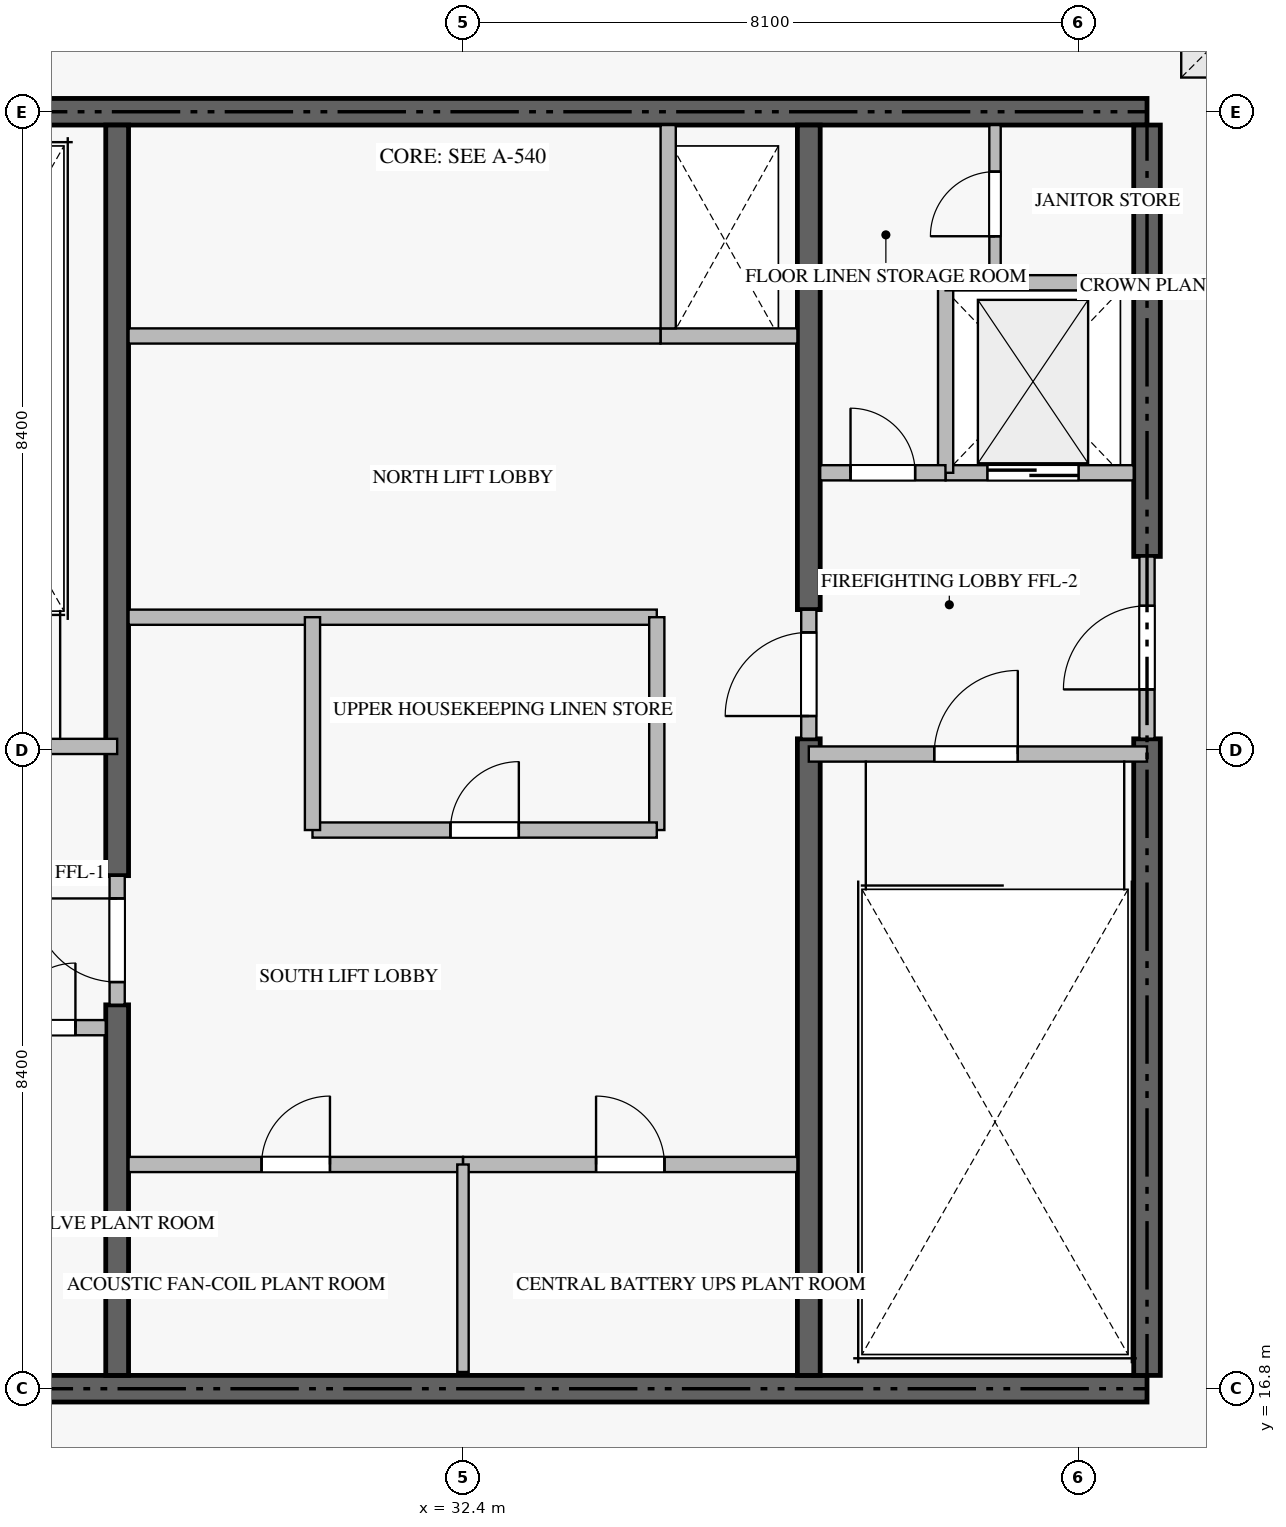
"""IFC4 building model, lengths in metres.
Left out: names, types, materials, properties, quantities, classifications, styles, units other than length and angle.
Written with IfcOpenShell. Run it as: python <this file> out.ifc"""

import sys

from ifc_helpers import new_model, si_unit, direction, frame, frame_2d, origin, origin_2d, place, context, subcontext, project, spatial, rectangle, extrude, source, transform, mapped, element, fill, save


model = new_model("IFC4")
c1 = context("Model", 3, precision=1e-05, world=origin(), true_north=direction((0.0, 1.0)))
c2 = subcontext(c1, "Body", "Model", "MODEL_VIEW")
j1 = project(units=[si_unit("LENGTHUNIT", "METRE"), si_unit("PLANEANGLEUNIT", "RADIAN")], contexts=[c1])
p1 = place(None, origin())
s1 = spatial("IfcSite", under=j1, at=p1, CompositionType="ELEMENT")
p2 = place(p1, origin())
s2 = spatial("IfcBuilding", under=s1, at=p2, CompositionType="ELEMENT")
p3 = place(p2, frame((0.0, 0.0, 365.75)))
s3 = spatial("IfcBuildingStorey", under=s2, at=p3, CompositionType="ELEMENT", Elevation=365.75)
for number, where, z_axis, x_axis in (
    (1, (23.4, 16.8, -0.36), (0.0, 0.0, 1.0), (1.0, 0.0, 0.0)),
    (2, (41.4, 33.6, -0.36), (0.0, 0.0, 1.0), (-1.0, 0.0, 0.0)),
):
    element("IfcWall", number, at=place(p3, frame(where, z_axis=z_axis, x_axis=x_axis)), inside=s3, PredefinedType="SHEAR", context=c2, shape_type="SweptSolid", body=[
        extrude(rectangle(XDim=18.0, YDim=0.35, at=frame_2d((9.0, 0.0))), origin(), (0.0, 0.0, 1.0), 5.258),
    ])
p4 = place(p3, frame((41.4, 16.975, -0.36), z_axis=(0.0, 0.0, 1.0), x_axis=(0.0, 1.0, 0.0)))
e3 = element("IfcWall", 3, at=p4, inside=s3, PredefinedType="SHEAR", context=c2, shape_type="SweptSolid", body=[
    extrude(rectangle(XDim=8.375, YDim=0.35, at=frame_2d((4.188, 0.0))), origin(), (0.0, 0.0, 1.0), 5.258),
])
p5 = place(p3, frame((41.4, 27.75, -0.36), z_axis=(0.0, 0.0, 1.0), x_axis=(0.0, 1.0, 0.0)))
e4 = element("IfcWall", 4, at=p5, inside=s3, PredefinedType="SHEAR", context=c2, shape_type="SweptSolid", body=[
    extrude(rectangle(XDim=5.675, YDim=0.35, at=frame_2d((2.837, 0.0))), origin(), (0.0, 0.0, 1.0), 5.258),
])
p6 = place(p3, frame((27.85, 16.975, -0.36), z_axis=(0.0, 0.0, 1.0), x_axis=(0.0, 1.0, 0.0)))
e5 = element("IfcWall", 5, at=p6, inside=s3, PredefinedType="SHEAR", context=c2, shape_type="SweptSolid", body=[
    extrude(rectangle(XDim=4.875, YDim=0.3, at=frame_2d((2.438, 0.0))), origin(), (0.0, 0.0, 1.0), 5.258),
])
p7 = place(p3, frame((27.85, 23.55, -0.36), z_axis=(0.0, 0.0, 1.0), x_axis=(0.0, 1.0, 0.0)))
e6 = element("IfcWall", 6, at=p7, inside=s3, PredefinedType="SHEAR", context=c2, shape_type="SweptSolid", body=[
    extrude(rectangle(XDim=9.875, YDim=0.3, at=frame_2d((4.938, 0.0))), origin(), (0.0, 0.0, 1.0), 5.258),
])
p8 = place(p3, frame((36.95, 16.975, -0.36), z_axis=(0.0, 0.0, 1.0), x_axis=(0.0, 1.0, 0.0)))
e7 = element("IfcWall", 7, at=p8, inside=s3, PredefinedType="SHEAR", context=c2, shape_type="SweptSolid", body=[
    extrude(rectangle(XDim=8.375, YDim=0.3, at=frame_2d((4.188, 0.0))), origin(), (0.0, 0.0, 1.0), 5.258),
])
p9 = place(p3, frame((36.95, 27.05, -0.36), z_axis=(0.0, 0.0, 1.0), x_axis=(0.0, 1.0, 0.0)))
e8 = element("IfcWall", 8, at=p9, inside=s3, PredefinedType="SHEAR", context=c2, shape_type="SweptSolid", body=[
    extrude(rectangle(XDim=6.375, YDim=0.3, at=frame_2d((3.188, 0.0))), origin(), (0.0, 0.0, 1.0), 5.258),
])
p10 = place(p3, frame((23.4, 25.25, 0.0), z_axis=(0.0, 0.0, 1.0), x_axis=(1.0, 0.0, 0.0)))
e9 = element("IfcWall", 9, at=p10, inside=s3, PredefinedType="STANDARD", context=c2, shape_type="SweptSolid", body=[
    extrude(rectangle(XDim=4.45, YDim=0.2, at=frame_2d((2.225, 0.0))), origin(), (0.0, 0.0, 1.0), 4.9),
])
p11 = place(p10, frame((1.65, 0.0, 0.0)))
e10 = element("IfcOpeningElement", 10, at=p11, cuts=e9, PredefinedType="OPENING", context=c2, shape_type="SweptSolid", body=[
    extrude(rectangle(XDim=1.1, YDim=2.15, at=frame_2d((0.55, 1.075))), frame((0.0, 0.11, 0.0), z_axis=(0.0, -1.0, 0.0), x_axis=(1.0, 0.0, 0.0)), (0.0, 0.0, 1.0), 0.22),
])
p12 = place(p3, frame((36.95, 25.15, 0.0), z_axis=(0.0, 0.0, 1.0), x_axis=(1.0, 0.0, 0.0)))
e11 = element("IfcWall", 11, at=p12, inside=s3, PredefinedType="STANDARD", context=c2, shape_type="SweptSolid", body=[
    extrude(rectangle(XDim=4.45, YDim=0.2, at=frame_2d((2.225, 0.0))), origin(), (0.0, 0.0, 1.0), 4.9),
])
p13 = place(p12, frame((1.65, 0.0, 0.0)))
e12 = element("IfcOpeningElement", 12, at=p13, cuts=e11, PredefinedType="OPENING", context=c2, shape_type="SweptSolid", body=[
    extrude(rectangle(XDim=1.1, YDim=2.15, at=frame_2d((0.55, 1.075))), frame((0.0, 0.11, 0.0), z_axis=(0.0, -1.0, 0.0), x_axis=(1.0, 0.0, 0.0)), (0.0, 0.0, 1.0), 0.22),
])
p14 = place(p3, frame((38.75, 28.85, 0.0), z_axis=(0.0, 0.0, 1.0), x_axis=(1.0, 0.0, 0.0)))
e13 = element("IfcWall", 13, at=p14, inside=s3, PredefinedType="STANDARD", context=c2, shape_type="SweptSolid", body=[
    extrude(rectangle(XDim=2.475, YDim=0.2, at=frame_2d((1.238, 0.0))), origin(), (0.0, 0.0, 1.0), 4.9),
])
p15 = place(p14, frame((0.55, 0.0, 0.0)))
e14 = element("IfcOpeningElement", 14, at=p15, cuts=e13, PredefinedType="OPENING", context=c2, shape_type="SweptSolid", body=[
    extrude(rectangle(XDim=1.2, YDim=2.2, at=frame_2d((0.6, 1.1))), frame((0.0, 0.11, 0.0), z_axis=(0.0, -1.0, 0.0), x_axis=(1.0, 0.0, 0.0)), (0.0, 0.0, 1.0), 0.22),
])
p16 = place(p3, frame((35.0, 30.65, 0.0), z_axis=(0.0, 0.0, 1.0), x_axis=(1.0, 0.0, 0.0)))
e15 = element("IfcWall", 15, at=p16, inside=s3, PredefinedType="STANDARD", context=c2, shape_type="SweptSolid", body=[
    extrude(rectangle(XDim=1.8, YDim=0.2, at=frame_2d((0.9, 0.0))), origin(), (0.0, 0.0, 1.0), 4.9),
])
p17 = place(p3, frame((35.1, 30.75, 0.0), z_axis=(0.0, 0.0, 1.0), x_axis=(0.0, 1.0, 0.0)))
e16 = element("IfcWall", 16, at=p17, inside=s3, PredefinedType="STANDARD", context=c2, shape_type="SweptSolid", body=[
    extrude(rectangle(XDim=2.675, YDim=0.2, at=frame_2d((1.337, 0.0))), origin(), (0.0, 0.0, 1.0), 4.9),
])
p18 = place(p3, frame((26.052, 21.55, 0.0), z_axis=(0.0, 0.0, 1.0), x_axis=(1.0, 0.0, 0.0)))
e17 = element("IfcWall", 17, at=p18, inside=s3, PredefinedType="STANDARD", context=c2, shape_type="SweptSolid", body=[
    extrude(rectangle(XDim=1.648, YDim=0.2, at=frame_2d((0.824, 0.0))), origin(), (0.0, 0.0, 1.0), 4.9),
])
p19 = place(p18, frame((0.399, 0.0, 0.0)))
e18 = element("IfcOpeningElement", 18, at=p19, cuts=e17, PredefinedType="OPENING", context=c2, shape_type="SweptSolid", body=[
    extrude(rectangle(XDim=0.85, YDim=2.1, at=frame_2d((0.425, 1.05))), frame((0.0, 0.11, 0.0), z_axis=(0.0, -1.0, 0.0), x_axis=(1.0, 0.0, 0.0)), (0.0, 0.0, 1.0), 0.22),
])
p20 = place(p3, frame((38.75, 28.85, 0.0), z_axis=(0.0, 0.0, 1.0), x_axis=(0.0, 1.0, 0.0)))
e19 = element("IfcWall", 19, at=p20, inside=s3, PredefinedType="STANDARD", context=c2, shape_type="SweptSolid", body=[
    extrude(rectangle(XDim=2.5, YDim=0.2, at=frame_2d((1.25, 0.0))), origin(), (0.0, 0.0, 1.0), 4.9),
])
p21 = place(p3, frame((38.75, 31.35, 0.0), z_axis=(0.0, 0.0, 1.0), x_axis=(1.0, 0.0, 0.0)))
e20 = element("IfcWall", 20, at=p21, inside=s3, PredefinedType="STANDARD", context=c2, shape_type="SweptSolid", body=[
    extrude(rectangle(XDim=2.475, YDim=0.2, at=frame_2d((1.238, 0.0))), origin(), (0.0, 0.0, 1.0), 4.9),
])
p22 = place(p3, frame((37.1, 28.85, 0.0), z_axis=(0.0, 0.0, 1.0), x_axis=(1.0, 0.0, 0.0)))
e21 = element("IfcWall", 21, at=p22, inside=s3, PredefinedType="STANDARD", context=c2, shape_type="SweptSolid", body=[
    extrude(rectangle(XDim=1.648, YDim=0.2, at=frame_2d((0.824, 0.0))), origin(), (0.0, 0.0, 1.0), 4.9),
])
p23 = place(p22, frame((0.399, 0.0, 0.0)))
e22 = element("IfcOpeningElement", 22, at=p23, cuts=e21, PredefinedType="OPENING", context=c2, shape_type="SweptSolid", body=[
    extrude(rectangle(XDim=0.85, YDim=2.1, at=frame_2d((0.425, 1.05))), frame((0.0, 0.11, 0.0), z_axis=(0.0, -1.0, 0.0), x_axis=(1.0, 0.0, 0.0)), (0.0, 0.0, 1.0), 0.22),
])
p24 = place(p3, frame((41.4, 25.352, 0.0), z_axis=(0.0, 0.0, 1.0), x_axis=(0.0, 1.0, 0.0)))
e23 = element("IfcWall", 23, at=p24, inside=s3, PredefinedType="STANDARD", context=c2, shape_type="SweptSolid", body=[
    extrude(rectangle(XDim=2.396, YDim=0.2, at=frame_2d((1.198, 0.0))), origin(), (0.0, 0.0, 1.0), 4.9),
])
p25 = place(p24, frame((0.648, 0.0, 0.0)))
e24 = element("IfcOpeningElement", 24, at=p25, cuts=e23, PredefinedType="OPENING", context=c2, shape_type="SweptSolid", body=[
    extrude(rectangle(XDim=1.1, YDim=2.15, at=frame_2d((0.55, 1.075))), frame((0.0, 0.11, 0.0), z_axis=(0.0, -1.0, 0.0), x_axis=(1.0, 0.0, 0.0)), (0.0, 0.0, 1.0), 0.22),
])
p26 = place(p3, frame((27.85, 21.852, 0.0), z_axis=(0.0, 0.0, 1.0), x_axis=(0.0, 1.0, 0.0)))
e25 = element("IfcWall", 25, at=p26, inside=s3, PredefinedType="STANDARD", context=c2, shape_type="SweptSolid", body=[
    extrude(rectangle(XDim=1.696, YDim=0.2, at=frame_2d((0.848, 0.0))), origin(), (0.0, 0.0, 1.0), 4.9),
])
p27 = place(p26, frame((0.298, 0.0, 0.0)))
e26 = element("IfcOpeningElement", 26, at=p27, cuts=e25, PredefinedType="OPENING", context=c2, shape_type="SweptSolid", body=[
    extrude(rectangle(XDim=1.1, YDim=2.15, at=frame_2d((0.55, 1.075))), frame((0.0, 0.11, 0.0), z_axis=(0.0, -1.0, 0.0), x_axis=(1.0, 0.0, 0.0)), (0.0, 0.0, 1.0), 0.22),
])
p28 = place(p3, frame((36.95, 25.352, 0.0), z_axis=(0.0, 0.0, 1.0), x_axis=(0.0, 1.0, 0.0)))
e27 = element("IfcWall", 27, at=p28, inside=s3, PredefinedType="STANDARD", context=c2, shape_type="SweptSolid", body=[
    extrude(rectangle(XDim=1.696, YDim=0.2, at=frame_2d((0.848, 0.0))), origin(), (0.0, 0.0, 1.0), 4.9),
])
p29 = place(p28, frame((0.298, 0.0, 0.0)))
e28 = element("IfcOpeningElement", 28, at=p29, cuts=e27, PredefinedType="OPENING", context=c2, shape_type="SweptSolid", body=[
    extrude(rectangle(XDim=1.1, YDim=2.15, at=frame_2d((0.55, 1.075))), frame((0.0, 0.11, 0.0), z_axis=(0.0, -1.0, 0.0), x_axis=(1.0, 0.0, 0.0)), (0.0, 0.0, 1.0), 0.22),
])
p30 = place(p3, frame((28.0, 30.65, 0.0), z_axis=(0.0, 0.0, 1.0), x_axis=(1.0, 0.0, 0.0)))
e29 = element("IfcWall", 29, at=p30, inside=s3, PredefinedType="STANDARD", context=c2, shape_type="SweptSolid", body=[
    extrude(rectangle(XDim=6.998, YDim=0.2, at=frame_2d((3.499, 0.0))), origin(), (0.0, 0.0, 1.0), 4.9),
])
p31 = place(p3, frame((39.4, 31.35, 0.0), z_axis=(0.0, 0.0, 1.0), x_axis=(0.0, 1.0, 0.0)))
e30 = element("IfcWall", 30, at=p31, inside=s3, PredefinedType="PARTITIONING", context=c2, shape_type="SweptSolid", body=[
    extrude(rectangle(XDim=2.075, YDim=0.15, at=frame_2d((1.038, 0.0))), origin(), (0.0, 0.0, 1.0), 4.9),
])
p32 = place(p31, frame((0.612, 0.0, 0.0)))
e31 = element("IfcOpeningElement", 31, at=p32, cuts=e30, PredefinedType="OPENING", context=c2, shape_type="SweptSolid", body=[
    extrude(rectangle(XDim=0.85, YDim=2.1, at=frame_2d((0.425, 1.05))), frame((0.0, 0.085, 0.0), z_axis=(0.0, -1.0, 0.0), x_axis=(1.0, 0.0, 0.0)), (0.0, 0.0, 1.0), 0.17),
])
p33 = place(p3, frame((28.0, 19.75, 0.0), z_axis=(0.0, 0.0, 1.0), x_axis=(1.0, 0.0, 0.0)))
e32 = element("IfcWall", 32, at=p33, inside=s3, PredefinedType="STANDARD", context=c2, shape_type="SweptSolid", body=[
    extrude(rectangle(XDim=4.4, YDim=0.2, at=frame_2d((2.2, 0.0))), origin(), (0.0, 0.0, 1.0), 4.9),
])
p34 = place(p33, frame((1.75, 0.0, 0.0)))
e33 = element("IfcOpeningElement", 33, at=p34, cuts=e32, PredefinedType="OPENING", context=c2, shape_type="SweptSolid", body=[
    extrude(rectangle(XDim=0.9, YDim=2.1, at=frame_2d((0.45, 1.05))), frame((0.0, 0.11, 0.0), z_axis=(0.0, -1.0, 0.0), x_axis=(1.0, 0.0, 0.0)), (0.0, 0.0, 1.0), 0.22),
])
p35 = place(p3, frame((32.402, 19.75, 0.0), z_axis=(0.0, 0.0, 1.0), x_axis=(1.0, 0.0, 0.0)))
e34 = element("IfcWall", 34, at=p35, inside=s3, PredefinedType="STANDARD", context=c2, shape_type="SweptSolid", body=[
    extrude(rectangle(XDim=4.398, YDim=0.2, at=frame_2d((2.199, 0.0))), origin(), (0.0, 0.0, 1.0), 4.9),
])
p36 = place(p35, frame((1.749, 0.0, 0.0)))
e35 = element("IfcOpeningElement", 35, at=p36, cuts=e34, PredefinedType="OPENING", context=c2, shape_type="SweptSolid", body=[
    extrude(rectangle(XDim=0.9, YDim=2.1, at=frame_2d((0.45, 1.05))), frame((0.0, 0.11, 0.0), z_axis=(0.0, -1.0, 0.0), x_axis=(1.0, 0.0, 0.0)), (0.0, 0.0, 1.0), 0.22),
])
p37 = place(p3, frame((32.4, 17.02, 0.0), z_axis=(0.0, 0.0, 1.0), x_axis=(0.0, 1.0, 0.0)))
e36 = element("IfcWall", 36, at=p37, inside=s3, PredefinedType="PARTITIONING", context=c2, shape_type="SweptSolid", body=[
    extrude(rectangle(XDim=2.73, YDim=0.15, at=frame_2d((1.365, 0.0))), origin(), (0.0, 0.0, 1.0), 4.9),
])
p38 = place(p3, frame((28.0, 26.95, 0.0), z_axis=(0.0, 0.0, 1.0), x_axis=(1.0, 0.0, 0.0)))
e37 = element("IfcWall", 37, at=p38, inside=s3, PredefinedType="STANDARD", context=c2, shape_type="SweptSolid", body=[
    extrude(rectangle(XDim=6.95, YDim=0.2, at=frame_2d((3.475, 0.0))), origin(), (0.0, 0.0, 1.0), 4.9),
])
p39 = place(p3, frame((34.95, 24.15, 0.0), z_axis=(0.0, 0.0, 1.0), x_axis=(0.0, 1.0, 0.0)))
e38 = element("IfcWall", 38, at=p39, inside=s3, PredefinedType="STANDARD", context=c2, shape_type="SweptSolid", body=[
    extrude(rectangle(XDim=2.8, YDim=0.2, at=frame_2d((1.4, 0.0))), origin(), (0.0, 0.0, 1.0), 4.9),
])
p40 = place(p3, frame((30.42, 24.15, 0.0), z_axis=(0.0, 0.0, 1.0), x_axis=(1.0, 0.0, 0.0)))
e39 = element("IfcWall", 39, at=p40, inside=s3, PredefinedType="STANDARD", context=c2, shape_type="SweptSolid", body=[
    extrude(rectangle(XDim=4.53, YDim=0.2, at=frame_2d((2.265, 0.0))), origin(), (0.0, 0.0, 1.0), 4.9),
])
p41 = place(p40, frame((1.815, 0.0, 0.0)))
e40 = element("IfcOpeningElement", 40, at=p41, cuts=e39, PredefinedType="OPENING", context=c2, shape_type="SweptSolid", body=[
    extrude(rectangle(XDim=0.9, YDim=2.1, at=frame_2d((0.45, 1.05))), frame((0.0, 0.11, 0.0), z_axis=(0.0, -1.0, 0.0), x_axis=(1.0, 0.0, 0.0)), (0.0, 0.0, 1.0), 0.22),
])
p42 = place(p3, frame((30.42, 24.15, 0.0), z_axis=(0.0, 0.0, 1.0), x_axis=(0.0, 1.0, 0.0)))
e41 = element("IfcWall", 41, at=p42, inside=s3, PredefinedType="STANDARD", context=c2, shape_type="SweptSolid", body=[
    extrude(rectangle(XDim=2.8, YDim=0.2, at=frame_2d((1.4, 0.0))), origin(), (0.0, 0.0, 1.0), 4.9),
])
p43 = place(p2, frame((0.0, 0.0, 370.95)))
p44 = place(p43, frame((0.0, 0.0, -0.3)))
p45 = place(p44, frame((42.4, 34.6, 0.0)))
p46 = place(p45, frame((0.0, 0.0, 0.26)))
e42 = element("IfcDoor", 42, at=p46, inside=s3, OperationType="SINGLE_SWING_LEFT", PredefinedType="TRAPDOOR", context=c2, shape_type="SweptSolid", body=[
    extrude(rectangle(XDim=1.1, YDim=1.1, at=origin_2d()), origin(), (0.0, 0.0, 1.0), 0.04),
])
m1 = source(origin(), c2, "Body", "SweptSolid", [
    extrude(rectangle(XDim=1.1, YDim=2.15, at=frame_2d((0.55, 1.075))), frame((0.0, 0.025, 0.0), z_axis=(0.0, -1.0, 0.0), x_axis=(1.0, 0.0, 0.0)), (0.0, 0.0, 1.0), 0.05),
])
p47 = place(p13, origin())
e43 = element("IfcDoor", 43, at=p47, inside=s3, OperationType="SINGLE_SWING_RIGHT", PredefinedType="DOOR", context=c2, shape_type="MappedRepresentation", body=[
    mapped(m1, transform((0.0, 0.0, 0.0), scale=1.0)),
])
fill(e12, e43)
m2 = source(origin(), c2, "Body", "SweptSolid", [
    extrude(rectangle(XDim=1.2, YDim=2.2, at=frame_2d((0.6, 1.1))), frame((0.0, 0.025, 0.0), z_axis=(0.0, -1.0, 0.0), x_axis=(1.0, 0.0, 0.0)), (0.0, 0.0, 1.0), 0.05),
])
p48 = place(p15, origin())
e44 = element("IfcDoor", 44, at=p48, inside=s3, OperationType="DOUBLE_DOOR_SLIDING", PredefinedType="DOOR", context=c2, shape_type="MappedRepresentation", body=[
    mapped(m2, transform((0.0, 0.0, 0.0), scale=1.0)),
])
fill(e14, e44)
m3 = source(origin(), c2, "Body", "SweptSolid", [
    extrude(rectangle(XDim=0.85, YDim=2.1, at=frame_2d((0.425, 1.05))), frame((0.0, 0.025, 0.0), z_axis=(0.0, -1.0, 0.0), x_axis=(1.0, 0.0, 0.0)), (0.0, 0.0, 1.0), 0.05),
])
p49 = place(p19, origin())
e45 = element("IfcDoor", 45, at=p49, inside=s3, OperationType="SINGLE_SWING_RIGHT", PredefinedType="DOOR", context=c2, shape_type="MappedRepresentation", body=[
    mapped(m3, transform((0.0, 0.0, 0.0), scale=1.0)),
])
fill(e18, e45)
p50 = place(p23, origin())
e46 = element("IfcDoor", 46, at=p50, inside=s3, OperationType="SINGLE_SWING_LEFT", PredefinedType="DOOR", context=c2, shape_type="MappedRepresentation", body=[
    mapped(m3, transform((0.0, 0.0, 0.0), scale=1.0)),
])
fill(e22, e46)
p51 = place(p25, origin())
e47 = element("IfcDoor", 47, at=p51, inside=s3, OperationType="SINGLE_SWING_LEFT", PredefinedType="DOOR", context=c2, shape_type="MappedRepresentation", body=[
    mapped(m1, transform((0.0, 0.0, 0.0), scale=1.0)),
])
fill(e24, e47)
p52 = place(p27, origin())
e48 = element("IfcDoor", 48, at=p52, inside=s3, OperationType="SINGLE_SWING_RIGHT", PredefinedType="DOOR", context=c2, shape_type="MappedRepresentation", body=[
    mapped(m1, transform((0.0, 0.0, 0.0), scale=1.0)),
])
fill(e26, e48)
p53 = place(p29, origin())
e49 = element("IfcDoor", 49, at=p53, inside=s3, OperationType="SINGLE_SWING_LEFT", PredefinedType="DOOR", context=c2, shape_type="MappedRepresentation", body=[
    mapped(m1, transform((0.0, 0.0, 0.0), scale=1.0)),
])
fill(e28, e49)
p54 = place(p32, origin())
e50 = element("IfcDoor", 50, at=p54, inside=s3, OperationType="SINGLE_SWING_LEFT", PredefinedType="DOOR", context=c2, shape_type="MappedRepresentation", body=[
    mapped(m3, transform((0.0, 0.0, 0.0), scale=1.0)),
])
fill(e31, e50)
m4 = source(origin(), c2, "Body", "SweptSolid", [
    extrude(rectangle(XDim=0.9, YDim=2.1, at=frame_2d((0.45, 1.05))), frame((0.0, 0.025, 0.0), z_axis=(0.0, -1.0, 0.0), x_axis=(1.0, 0.0, 0.0)), (0.0, 0.0, 1.0), 0.05),
])
p55 = place(p34, origin())
e51 = element("IfcDoor", 51, at=p55, inside=s3, OperationType="SINGLE_SWING_RIGHT", PredefinedType="DOOR", context=c2, shape_type="MappedRepresentation", body=[
    mapped(m4, transform((0.0, 0.0, 0.0), scale=1.0)),
])
fill(e33, e51)
p56 = place(p36, origin())
e52 = element("IfcDoor", 52, at=p56, inside=s3, OperationType="SINGLE_SWING_LEFT", PredefinedType="DOOR", context=c2, shape_type="MappedRepresentation", body=[
    mapped(m4, transform((0.0, 0.0, 0.0), scale=1.0)),
])
fill(e35, e52)
p57 = place(p41, origin())
e53 = element("IfcDoor", 53, at=p57, inside=s3, OperationType="SINGLE_SWING_RIGHT", PredefinedType="DOOR", context=c2, shape_type="MappedRepresentation", body=[
    mapped(m4, transform((0.0, 0.0, 0.0), scale=1.0)),
])
fill(e40, e53)
save(model, sys.argv[1])
